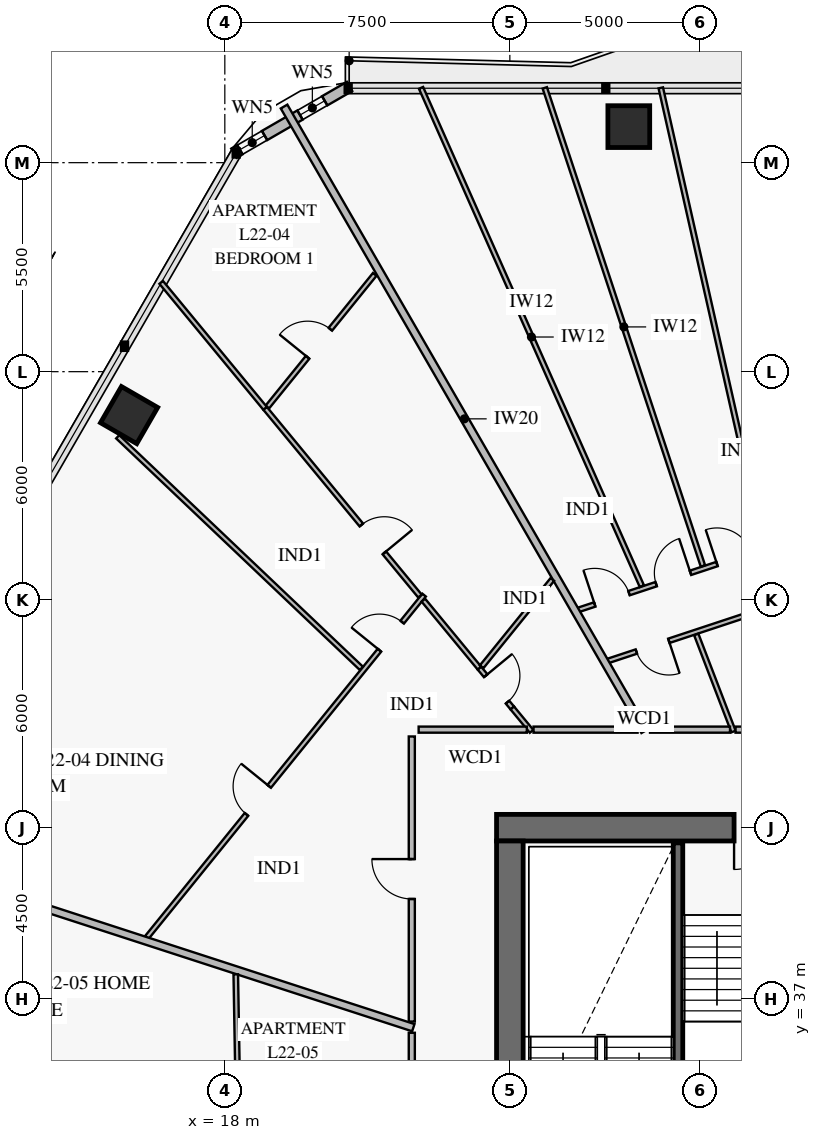
"""IFC4 building model, lengths in metres.
Left out: names, types, materials, properties, quantities, classifications, styles, units other than length and angle.
Written with IfcOpenShell. Run it as: python <this file> out.ifc"""

import sys

from ifc_helpers import new_model, si_unit, direction, frame, frame_2d, origin, origin_2d, place, context, subcontext, project, spatial, rectangle, extrude, element, fill, save


model = new_model("IFC4")
c1 = context("Model", 3, precision=1e-05, world=origin(), true_north=direction((0.0, 1.0)))
c2 = subcontext(c1, "Body", "Model", "MODEL_VIEW")
j1 = project(units=[si_unit("LENGTHUNIT", "METRE"), si_unit("PLANEANGLEUNIT", "RADIAN")], contexts=[c1])
p1 = place(None, origin())
s1 = spatial("IfcSite", under=j1, at=p1, CompositionType="ELEMENT")
p2 = place(p1, origin())
s2 = spatial("IfcBuilding", under=s1, at=p2, CompositionType="ELEMENT")
p3 = place(p2, frame((0.0, 0.0, 92.4)))
s3 = spatial("IfcBuildingStorey", under=s2, at=p3, CompositionType="ELEMENT", Elevation=92.4)
p4 = place(p3, frame((36.75, 41.5, 0.0), z_axis=(0.0, 0.0, 1.0), x_axis=(-1.0, 0.0, 0.0)))
e1 = element("IfcWall", 1, at=p4, inside=s3, PredefinedType="SHEAR", context=c2, shape_type="SweptSolid", body=[
    extrude(rectangle(XDim=11.6, YDim=0.7, at=frame_2d((5.8, 0.0))), origin(), (0.0, 0.0, 1.0), 3.8),
])
p5 = place(p4, frame((4.25, 0.0, 0.0)))
e2 = element("IfcOpeningElement", 2, at=p5, cuts=e1, PredefinedType="OPENING", context=c2, shape_type="SweptSolid", body=[
    extrude(rectangle(XDim=1.1, YDim=2.15, at=frame_2d((0.55, 1.075))), frame((0.0, 0.362, 0.0), z_axis=(0.0, -1.0, 0.0), x_axis=(1.0, 0.0, 0.0)), (0.0, 0.0, 1.0), 0.724),
])
p6 = place(p3, frame((25.5, 22.85, 0.0), z_axis=(0.0, 0.0, 1.0), x_axis=(0.0, 1.0, 0.0)))
e3 = element("IfcWall", 3, at=p6, inside=s3, PredefinedType="SHEAR", context=c2, shape_type="SweptSolid", body=[
    extrude(rectangle(XDim=18.3, YDim=0.7, at=frame_2d((9.15, 0.0))), origin(), (0.0, 0.0, 1.0), 3.8),
])
p7 = place(p6, frame((8.9, 0.0, 0.0)))
e4 = element("IfcOpeningElement", 4, at=p7, cuts=e3, PredefinedType="OPENING", context=c2, shape_type="SweptSolid", body=[
    extrude(rectangle(XDim=1.1, YDim=2.15, at=frame_2d((0.55, 1.075))), frame((0.0, 0.362, 0.0), z_axis=(0.0, -1.0, 0.0), x_axis=(1.0, 0.0, 0.0)), (0.0, 0.0, 1.0), 0.724),
])
for number, where, z_axis, x_axis in (
    (5, (28.63, 59.948, 0.0), (0.0, 0.0, 1.0), (-1.0, 0.0, 0.0)),
    (6, (15.481, 52.357, 0.0), (0.0, 0.0, 1.0), (-0.5, -0.866, 0.0)),
):
    element("IfcColumn", number, at=place(p3, frame(where, z_axis=z_axis, x_axis=x_axis)), inside=s3, PredefinedType="COLUMN", context=c2, shape_type="SweptSolid", body=[
        extrude(rectangle(XDim=1.1, YDim=1.1, at=origin_2d()), origin(), (0.0, 0.0, 1.0), 3.55),
    ])
p8 = place(p3, frame((18.239, 59.249, 0.0), z_axis=(0.0, 0.0, 1.0), x_axis=(0.866007452331, 0.500031091541, 0.0)))
e7 = element("IfcWall", 7, at=p8, inside=s3, PredefinedType="SOLIDWALL", context=c2, shape_type="SweptSolid", body=[
    extrude(rectangle(XDim=3.515, YDim=0.28, at=frame_2d((1.757, 0.0))), origin(), (0.0, 0.0, 1.0), 3.55),
])
p9 = place(p8, frame((2.009, 0.0, 0.85)))
e8 = element("IfcOpeningElement", 8, at=p9, cuts=e7, PredefinedType="OPENING", context=c2, shape_type="SweptSolid", body=[
    extrude(rectangle(XDim=0.75, YDim=1.5, at=frame_2d((0.375, 0.75))), frame((0.0, 0.152, 0.0), z_axis=(0.0, -1.0, 0.0), x_axis=(1.0, 0.0, 0.0)), (0.0, 0.0, 1.0), 0.304),
])
p10 = place(p8, frame((0.182, 0.0, 0.85)))
e9 = element("IfcOpeningElement", 9, at=p10, cuts=e7, PredefinedType="OPENING", context=c2, shape_type="SweptSolid", body=[
    extrude(rectangle(XDim=0.75, YDim=1.5, at=frame_2d((0.375, 0.75))), frame((0.0, 0.152, 0.0), z_axis=(0.0, -1.0, 0.0), x_axis=(1.0, 0.0, 0.0)), (0.0, 0.0, 1.0), 0.304),
])
p11 = place(p3, frame((29.925, 31.4, 0.0), z_axis=(0.0, 0.0, 1.0), x_axis=(0.0, 1.0, 0.0)))
e10 = element("IfcWall", 10, at=p11, inside=s3, PredefinedType="SOLIDWALL", context=c2, shape_type="SweptSolid", body=[
    extrude(rectangle(XDim=9.7, YDim=0.25, at=frame_2d((4.85, 0.0))), origin(), (0.0, 0.0, 1.0), 3.8),
])
p12 = place(p3, frame((34.122, 47.885, 0.0), z_axis=(0.0, 0.0, 1.0), x_axis=(-0.949423400421, -0.313998736834, 0.0)))
e11 = element("IfcWall", 11, at=p12, inside=s3, PredefinedType="PARTITIONING", context=c2, shape_type="SweptSolid", body=[
    extrude(rectangle(XDim=6.41, YDim=0.12, at=frame_2d((3.205, 0.0))), origin(), (0.0, 0.0, 1.0), 2.85),
])
p13 = place(p12, frame((1.546, 0.0, 0.0)))
e12 = element("IfcOpeningElement", 12, at=p13, cuts=e11, PredefinedType="OPENING", context=c2, shape_type="SweptSolid", body=[
    extrude(rectangle(XDim=0.95, YDim=2.1, at=frame_2d((0.475, 1.05))), frame((0.0, 0.072, 0.0), z_axis=(0.0, -1.0, 0.0), x_axis=(1.0, 0.0, 0.0)), (0.0, 0.0, 1.0), 0.144),
])
p14 = place(p12, frame((4.674, 0.0, 0.0)))
e13 = element("IfcOpeningElement", 13, at=p14, cuts=e11, PredefinedType="OPENING", context=c2, shape_type="SweptSolid", body=[
    extrude(rectangle(XDim=0.9, YDim=2.1, at=frame_2d((0.45, 1.05))), frame((0.0, 0.072, 0.0), z_axis=(0.0, -1.0, 0.0), x_axis=(1.0, 0.0, 0.0)), (0.0, 0.0, 1.0), 0.144),
])
p15 = place(p3, frame((33.931, 49.423, 0.0), z_axis=(0.0, 0.0, 1.0), x_axis=(-0.949429209045, -0.313981173023, 0.0)))
e14 = element("IfcWall", 14, at=p15, inside=s3, PredefinedType="PARTITIONING", context=c2, shape_type="SweptSolid", body=[
    extrude(rectangle(XDim=7.012, YDim=0.12, at=frame_2d((3.506, 0.0))), origin(), (0.0, 0.0, 1.0), 2.85),
])
p16 = place(p15, frame((0.485, 0.0, 0.0)))
e15 = element("IfcOpeningElement", 15, at=p16, cuts=e14, PredefinedType="OPENING", context=c2, shape_type="SweptSolid", body=[
    extrude(rectangle(XDim=0.95, YDim=2.1, at=frame_2d((0.475, 1.05))), frame((0.0, 0.072, 0.0), z_axis=(0.0, -1.0, 0.0), x_axis=(1.0, 0.0, 0.0)), (0.0, 0.0, 1.0), 0.144),
])
p17 = place(p15, frame((2.188, 0.0, 0.0)))
e16 = element("IfcOpeningElement", 16, at=p17, cuts=e14, PredefinedType="OPENING", context=c2, shape_type="SweptSolid", body=[
    extrude(rectangle(XDim=0.95, YDim=2.1, at=frame_2d((0.475, 1.05))), frame((0.0, 0.072, 0.0), z_axis=(0.0, -1.0, 0.0), x_axis=(1.0, 0.0, 0.0)), (0.0, 0.0, 1.0), 0.144),
])
p18 = place(p15, frame((3.874, 0.0, 0.0)))
e17 = element("IfcOpeningElement", 17, at=p18, cuts=e14, PredefinedType="OPENING", context=c2, shape_type="SweptSolid", body=[
    extrude(rectangle(XDim=0.95, YDim=2.1, at=frame_2d((0.475, 1.05))), frame((0.0, 0.072, 0.0), z_axis=(0.0, -1.0, 0.0), x_axis=(1.0, 0.0, 0.0)), (0.0, 0.0, 1.0), 0.144),
])
p19 = place(p15, frame((5.577, 0.0, 0.0)))
e18 = element("IfcOpeningElement", 18, at=p19, cuts=e14, PredefinedType="OPENING", context=c2, shape_type="SweptSolid", body=[
    extrude(rectangle(XDim=0.95, YDim=2.1, at=frame_2d((0.475, 1.05))), frame((0.0, 0.072, 0.0), z_axis=(0.0, -1.0, 0.0), x_axis=(1.0, 0.0, 0.0)), (0.0, 0.0, 1.0), 0.144),
])
p20 = place(p3, frame((23.244, 47.621, 0.0), z_axis=(0.0, 0.0, 1.0), x_axis=(-0.629321725732, -0.777144880651, 0.0)))
e19 = element("IfcWall", 19, at=p20, inside=s3, PredefinedType="PARTITIONING", context=c2, shape_type="SweptSolid", body=[
    extrude(rectangle(XDim=11.601, YDim=0.12, at=frame_2d((5.8, 0.0))), origin(), (0.0, 0.0, 1.0), 2.85),
])
p21 = place(p20, frame((0.916, 0.0, 0.0)))
e20 = element("IfcOpeningElement", 20, at=p21, cuts=e19, PredefinedType="OPENING", context=c2, shape_type="SweptSolid", body=[
    extrude(rectangle(XDim=0.95, YDim=2.1, at=frame_2d((0.475, 1.05))), frame((0.0, 0.072, 0.0), z_axis=(0.0, -1.0, 0.0), x_axis=(1.0, 0.0, 0.0)), (0.0, 0.0, 1.0), 0.144),
])
p22 = place(p20, frame((6.476, 0.0, 0.0)))
e21 = element("IfcOpeningElement", 21, at=p22, cuts=e19, PredefinedType="OPENING", context=c2, shape_type="SweptSolid", body=[
    extrude(rectangle(XDim=0.95, YDim=2.1, at=frame_2d((0.475, 1.05))), frame((0.0, 0.072, 0.0), z_axis=(0.0, -1.0, 0.0), x_axis=(1.0, 0.0, 0.0)), (0.0, 0.0, 1.0), 0.144),
])
p23 = place(p3, frame((25.565, 44.65, 0.0), z_axis=(0.0, 0.0, 1.0), x_axis=(-0.636278938951, 0.771459079827, 0.0)))
e22 = element("IfcWall", 22, at=p23, inside=s3, PredefinedType="PARTITIONING", context=c2, shape_type="SweptSolid", body=[
    extrude(rectangle(XDim=1.362, YDim=0.12, at=frame_2d((0.681, 0.0))), origin(), (0.0, 0.0, 1.0), 3.55),
])
p24 = place(p23, frame((0.2, 0.0, 0.0)))
e23 = element("IfcOpeningElement", 23, at=p24, cuts=e22, PredefinedType="OPENING", context=c2, shape_type="SweptSolid", body=[
    extrude(rectangle(XDim=0.9, YDim=2.1, at=frame_2d((0.45, 1.05))), frame((0.0, 0.072, 0.0), z_axis=(0.0, -1.0, 0.0), x_axis=(1.0, 0.0, 0.0)), (0.0, 0.0, 1.0), 0.144),
])
p25 = place(p3, frame((24.698, 45.7, 0.0), z_axis=(0.0, 0.0, 1.0), x_axis=(-0.636404893794, 0.771355178342, 0.0)))
e24 = element("IfcWall", 24, at=p25, inside=s3, PredefinedType="PARTITIONING", context=c2, shape_type="SweptSolid", body=[
    extrude(rectangle(XDim=2.317, YDim=0.12, at=frame_2d((1.159, 0.0))), origin(), (0.0, 0.0, 1.0), 3.55),
])
p26 = place(p3, frame((23.135, 47.595, 0.0), z_axis=(0.0, 0.0, 1.0), x_axis=(-0.636375017003, 0.77137982715, 0.0)))
e25 = element("IfcWall", 25, at=p26, inside=s3, PredefinedType="PARTITIONING", context=c2, shape_type="SweptSolid", body=[
    extrude(rectangle(XDim=6.405, YDim=0.12, at=frame_2d((3.203, 0.0))), origin(), (0.0, 0.0, 1.0), 3.1),
])
p27 = place(p26, frame((1.474, 0.0, 0.0)))
e26 = element("IfcOpeningElement", 26, at=p27, cuts=e25, PredefinedType="OPENING", context=c2, shape_type="SweptSolid", body=[
    extrude(rectangle(XDim=0.95, YDim=2.1, at=frame_2d((0.475, 1.05))), frame((0.0, 0.072, 0.0), z_axis=(0.0, -1.0, 0.0), x_axis=(1.0, 0.0, 0.0)), (0.0, 0.0, 1.0), 0.144),
])
p28 = place(p3, frame((21.944, 56.059, 0.0), z_axis=(0.0, 0.0, 1.0), x_axis=(-0.629293659157, -0.777167607756, 0.0)))
e27 = element("IfcWall", 27, at=p28, inside=s3, PredefinedType="PARTITIONING", context=c2, shape_type="SweptSolid", body=[
    extrude(rectangle(XDim=4.489, YDim=0.12, at=frame_2d((2.245, 0.0))), origin(), (0.0, 0.0, 1.0), 2.8),
])
p29 = place(p28, frame((1.855, 0.0, 0.0)))
e28 = element("IfcOpeningElement", 28, at=p29, cuts=e27, PredefinedType="OPENING", context=c2, shape_type="SweptSolid", body=[
    extrude(rectangle(XDim=0.95, YDim=2.1, at=frame_2d((0.475, 1.05))), frame((0.0, 0.072, 0.0), z_axis=(0.0, -1.0, 0.0), x_axis=(1.0, 0.0, 0.0)), (0.0, 0.0, 1.0), 0.144),
])
p30 = place(p3, frame((22.92, 43.9, 0.0), z_axis=(0.0, 0.0, 1.0), x_axis=(0.0, -1.0, 0.0)))
e29 = element("IfcWall", 29, at=p30, inside=s3, PredefinedType="PARTITIONING", context=c2, shape_type="SweptSolid", body=[
    extrude(rectangle(XDim=7.502, YDim=0.16, at=frame_2d((3.751, 0.0))), origin(), (0.0, 0.0, 1.0), 3.55),
])
p31 = place(p30, frame((3.226, 0.0, 0.0)))
e30 = element("IfcOpeningElement", 30, at=p31, cuts=e29, PredefinedType="OPENING", context=c2, shape_type="SweptSolid", body=[
    extrude(rectangle(XDim=1.05, YDim=2.15, at=frame_2d((0.525, 1.075))), frame((0.0, 0.092, 0.0), z_axis=(0.0, -1.0, 0.0), x_axis=(1.0, 0.0, 0.0)), (0.0, 0.0, 1.0), 0.184),
])
p32 = place(p3, frame((31.385, 44.03, 0.0), z_axis=(0.0, 0.0, 1.0), x_axis=(-0.35815382697, 0.933662592282, 0.0)))
e31 = element("IfcWall", 31, at=p32, inside=s3, PredefinedType="PARTITIONING", context=c2, shape_type="SweptSolid", body=[
    extrude(rectangle(XDim=2.736, YDim=0.12, at=frame_2d((1.368, 0.0))), origin(), (0.0, 0.0, 1.0), 3.55),
])
p33 = place(p3, frame((32.188, 48.918, 0.0), z_axis=(0.0, 0.0, 1.0), x_axis=(-0.2198592635, 0.975531600848, 0.0)))
e32 = element("IfcWall", 32, at=p33, inside=s3, PredefinedType="PARTITIONING", context=c2, shape_type="SweptSolid", body=[
    extrude(rectangle(XDim=12.353, YDim=0.12, at=frame_2d((6.176, 0.0))), origin(), (0.0, 0.0, 1.0), 2.8),
])
p34 = place(p3, frame((30.581, 48.387, 0.0), z_axis=(0.0, 0.0, 1.0), x_axis=(-0.31398296165, 0.949428617534, 0.0)))
e33 = element("IfcWall", 33, at=p34, inside=s3, PredefinedType="PARTITIONING", context=c2, shape_type="SweptSolid", body=[
    extrude(rectangle(XDim=13.252, YDim=0.12, at=frame_2d((6.626, 0.0))), origin(), (0.0, 0.0, 1.0), 2.8),
])
p35 = place(p3, frame((28.974, 47.855, 0.0), z_axis=(0.0, 0.0, 1.0), x_axis=(-0.405149568186, 0.91425041832, 0.0)))
e34 = element("IfcWall", 34, at=p35, inside=s3, PredefinedType="PARTITIONING", context=c2, shape_type="SweptSolid", body=[
    extrude(rectangle(XDim=14.343, YDim=0.12, at=frame_2d((7.171, 0.0))), origin(), (0.0, 0.0, 1.0), 2.8),
])
p36 = place(p3, frame((29.049, 44.04, 0.0), z_axis=(0.0, 0.0, 1.0), x_axis=(-0.499993398997, 0.866029214842, 0.0)))
e35 = element("IfcWall", 35, at=p36, inside=s3, PredefinedType="PARTITIONING", context=c2, shape_type="SweptSolid", body=[
    extrude(rectangle(XDim=18.98, YDim=0.2, at=frame_2d((9.49, 0.0))), origin(), (0.0, 0.0, 1.0), 2.8),
])
p37 = place(p3, frame((21.594, 45.692, 0.0), z_axis=(0.0, 0.0, 1.0), x_axis=(-0.724829920805, 0.688927852467, 0.0)))
e36 = element("IfcWall", 36, at=p37, inside=s3, PredefinedType="PARTITIONING", context=c2, shape_type="SweptSolid", body=[
    extrude(rectangle(XDim=8.847, YDim=0.12, at=frame_2d((4.423, 0.0))), origin(), (0.0, 0.0, 1.0), 2.8),
])
p38 = place(p3, frame((26.072, 44.035, 0.0), z_axis=(0.0, 0.0, 1.0), x_axis=(-0.636351066899, 0.771399584947, 0.0)))
e37 = element("IfcWall", 37, at=p38, inside=s3, PredefinedType="PARTITIONING", context=c2, shape_type="SweptSolid", body=[
    extrude(rectangle(XDim=0.797, YDim=0.12, at=frame_2d((0.398, 0.0))), origin(), (0.0, 0.0, 1.0), 3.55),
])
p39 = place(p3, frame((19.059, 52.536, 0.0), z_axis=(0.0, 0.0, 1.0), x_axis=(-0.636324617316, 0.771421403254, 0.0)))
e38 = element("IfcWall", 38, at=p39, inside=s3, PredefinedType="PARTITIONING", context=c2, shape_type="SweptSolid", body=[
    extrude(rectangle(XDim=4.296, YDim=0.12, at=frame_2d((2.148, 0.0))), origin(), (0.0, 0.0, 1.0), 2.8),
])
p40 = place(p3, frame((26.619, 48.033, 0.0), z_axis=(0.0, 0.0, 1.0), x_axis=(-0.629295602894, -0.777166033855, 0.0)))
e39 = element("IfcWall", 39, at=p40, inside=s3, PredefinedType="PARTITIONING", context=c2, shape_type="SweptSolid", body=[
    extrude(rectangle(XDim=2.957, YDim=0.12, at=frame_2d((1.479, 0.0))), origin(), (0.0, 0.0, 1.0), 3.55),
])
p41 = place(p3, frame((22.96, 36.237, 0.0), z_axis=(0.0, 0.0, 1.0), x_axis=(-0.95105675479, 0.309016260362, 0.0)))
e40 = element("IfcWall", 40, at=p41, inside=s3, PredefinedType="PARTITIONING", context=c2, shape_type="SweptSolid", body=[
    extrude(rectangle(XDim=15.894, YDim=0.2, at=frame_2d((7.947, 0.0))), origin(), (0.0, 0.0, 1.0), 2.8),
])
p42 = place(p3, frame((18.288, 37.641, 0.0), z_axis=(0.0, 0.0, 1.0), x_axis=(0.017415945178, -0.999848330925, 0.0)))
e41 = element("IfcWall", 41, at=p42, inside=s3, PredefinedType="PARTITIONING", context=c2, shape_type="SweptSolid", body=[
    extrude(rectangle(XDim=4.514, YDim=0.12, at=frame_2d((2.257, 0.0))), origin(), (0.0, 0.0, 1.0), 2.85),
])
p43 = place(p3, frame((34.427, 44.08, 0.0), z_axis=(0.0, 0.0, 1.0), x_axis=(-1.0, 0.0, 0.0)))
e42 = element("IfcWall", 42, at=p43, inside=s3, PredefinedType="PARTITIONING", context=c2, shape_type="SweptSolid", body=[
    extrude(rectangle(XDim=2.988, YDim=0.16, at=frame_2d((1.494, 0.0))), origin(), (0.0, 0.0, 1.0), 2.85),
])
p44 = place(p3, frame((31.293, 44.08, 0.0), z_axis=(0.0, 0.0, 1.0), x_axis=(-1.0, 0.0, 0.0)))
e43 = element("IfcWall", 43, at=p44, inside=s3, PredefinedType="PARTITIONING", context=c2, shape_type="SweptSolid", body=[
    extrude(rectangle(XDim=2.104, YDim=0.16, at=frame_2d((1.052, 0.0))), origin(), (0.0, 0.0, 1.0), 3.55),
])
p45 = place(p3, frame((25.947, 44.08, 0.0), z_axis=(0.0, 0.0, 1.0), x_axis=(-1.0, 0.0, 0.0)))
e44 = element("IfcWall", 44, at=p45, inside=s3, PredefinedType="PARTITIONING", context=c2, shape_type="SweptSolid", body=[
    extrude(rectangle(XDim=2.847, YDim=0.16, at=frame_2d((1.423, 0.0))), origin(), (0.0, 0.0, 1.0), 2.85),
])
p46 = place(p3, frame((28.861, 44.08, 0.0), z_axis=(0.0, 0.0, 1.0), x_axis=(-1.0, 0.0, 0.0)))
e45 = element("IfcWall", 45, at=p46, inside=s3, PredefinedType="PARTITIONING", context=c2, shape_type="SweptSolid", body=[
    extrude(rectangle(XDim=2.738, YDim=0.16, at=frame_2d((1.369, 0.0))), origin(), (0.0, 0.0, 1.0), 3.55),
])
p47 = place(p3, frame((22.92, 36.103, 0.0), z_axis=(0.0, 0.0, 1.0), x_axis=(0.0, -1.0, 0.0)))
e46 = element("IfcWall", 46, at=p47, inside=s3, PredefinedType="PARTITIONING", context=c2, shape_type="SweptSolid", body=[
    extrude(rectangle(XDim=3.249, YDim=0.16, at=frame_2d((1.624, 0.0))), origin(), (0.0, 0.0, 1.0), 2.85),
])
p48 = place(p9, origin())
e47 = element("IfcWindow", 47, at=p48, inside=s3, PartitioningType="SINGLE_PANEL", PredefinedType="WINDOW", context=c2, shape_type="SweptSolid", body=[
    extrude(rectangle(XDim=0.75, YDim=1.5, at=frame_2d((0.375, 0.75))), frame((0.0, 0.03, 0.0), z_axis=(0.0, -1.0, 0.0), x_axis=(1.0, 0.0, 0.0)), (0.0, 0.0, 1.0), 0.06),
])
fill(e8, e47)
p49 = place(p10, origin())
e48 = element("IfcWindow", 48, at=p49, inside=s3, PartitioningType="SINGLE_PANEL", PredefinedType="WINDOW", context=c2, shape_type="SweptSolid", body=[
    extrude(rectangle(XDim=0.75, YDim=1.5, at=frame_2d((0.375, 0.75))), frame((0.0, 0.03, 0.0), z_axis=(0.0, -1.0, 0.0), x_axis=(1.0, 0.0, 0.0)), (0.0, 0.0, 1.0), 0.06),
])
fill(e9, e48)
p50 = place(p5, origin())
e49 = element("IfcDoor", 49, at=p50, inside=s3, OperationType="SINGLE_SWING_RIGHT", PredefinedType="USERDEFINED", context=c2, shape_type="SweptSolid", body=[
    extrude(rectangle(XDim=1.1, YDim=2.15, at=frame_2d((0.55, 1.075))), frame((0.0, 0.025, 0.0), z_axis=(0.0, -1.0, 0.0), x_axis=(1.0, 0.0, 0.0)), (0.0, 0.0, 1.0), 0.05),
])
fill(e2, e49)
p51 = place(p14, origin())
e50 = element("IfcDoor", 50, at=p51, inside=s3, OperationType="SINGLE_SWING_LEFT", PredefinedType="DOOR", context=c2, shape_type="SweptSolid", body=[
    extrude(rectangle(XDim=0.9, YDim=2.1, at=frame_2d((0.45, 1.05))), frame((0.0, 0.025, 0.0), z_axis=(0.0, -1.0, 0.0), x_axis=(1.0, 0.0, 0.0)), (0.0, 0.0, 1.0), 0.05),
])
fill(e13, e50)
p52 = place(p17, frame((0.95, 0.0, 0.0), z_axis=(0.0, 0.0, 1.0), x_axis=(-1.0, 0.0, 0.0)))
e51 = element("IfcDoor", 51, at=p52, inside=s3, OperationType="SINGLE_SWING_LEFT", PredefinedType="DOOR", context=c2, shape_type="SweptSolid", body=[
    extrude(rectangle(XDim=0.95, YDim=2.1, at=frame_2d((0.475, 1.05))), frame((0.0, 0.025, 0.0), z_axis=(0.0, -1.0, 0.0), x_axis=(1.0, 0.0, 0.0)), (0.0, 0.0, 1.0), 0.05),
])
fill(e16, e51)
p53 = place(p18, frame((0.95, 0.0, 0.0), z_axis=(0.0, 0.0, 1.0), x_axis=(-1.0, 0.0, 0.0)))
e52 = element("IfcDoor", 52, at=p53, inside=s3, OperationType="SINGLE_SWING_RIGHT", PredefinedType="DOOR", context=c2, shape_type="SweptSolid", body=[
    extrude(rectangle(XDim=0.95, YDim=2.1, at=frame_2d((0.475, 1.05))), frame((0.0, 0.025, 0.0), z_axis=(0.0, -1.0, 0.0), x_axis=(1.0, 0.0, 0.0)), (0.0, 0.0, 1.0), 0.05),
])
fill(e17, e52)
p54 = place(p19, frame((0.95, 0.0, 0.0), z_axis=(0.0, 0.0, 1.0), x_axis=(-1.0, 0.0, 0.0)))
e53 = element("IfcDoor", 53, at=p54, inside=s3, OperationType="SINGLE_SWING_LEFT", PredefinedType="DOOR", context=c2, shape_type="SweptSolid", body=[
    extrude(rectangle(XDim=0.95, YDim=2.1, at=frame_2d((0.475, 1.05))), frame((0.0, 0.025, 0.0), z_axis=(0.0, -1.0, 0.0), x_axis=(1.0, 0.0, 0.0)), (0.0, 0.0, 1.0), 0.05),
])
fill(e18, e53)
p55 = place(p21, frame((0.95, 0.0, 0.0), z_axis=(0.0, 0.0, 1.0), x_axis=(-1.0, 0.0, 0.0)))
e54 = element("IfcDoor", 54, at=p55, inside=s3, OperationType="SINGLE_SWING_LEFT", PredefinedType="DOOR", context=c2, shape_type="SweptSolid", body=[
    extrude(rectangle(XDim=0.95, YDim=2.1, at=frame_2d((0.475, 1.05))), frame((0.0, 0.025, 0.0), z_axis=(0.0, -1.0, 0.0), x_axis=(1.0, 0.0, 0.0)), (0.0, 0.0, 1.0), 0.05),
])
fill(e20, e54)
p56 = place(p22, frame((0.95, 0.0, 0.0), z_axis=(0.0, 0.0, 1.0), x_axis=(-1.0, 0.0, 0.0)))
e55 = element("IfcDoor", 55, at=p56, inside=s3, OperationType="SINGLE_SWING_RIGHT", PredefinedType="DOOR", context=c2, shape_type="SweptSolid", body=[
    extrude(rectangle(XDim=0.95, YDim=2.1, at=frame_2d((0.475, 1.05))), frame((0.0, 0.025, 0.0), z_axis=(0.0, -1.0, 0.0), x_axis=(1.0, 0.0, 0.0)), (0.0, 0.0, 1.0), 0.05),
])
fill(e21, e55)
p57 = place(p24, frame((0.9, 0.0, 0.0), z_axis=(0.0, 0.0, 1.0), x_axis=(-1.0, 0.0, 0.0)))
e56 = element("IfcDoor", 56, at=p57, inside=s3, OperationType="SINGLE_SWING_LEFT", PredefinedType="DOOR", context=c2, shape_type="SweptSolid", body=[
    extrude(rectangle(XDim=0.9, YDim=2.1, at=frame_2d((0.45, 1.05))), frame((0.0, 0.025, 0.0), z_axis=(0.0, -1.0, 0.0), x_axis=(1.0, 0.0, 0.0)), (0.0, 0.0, 1.0), 0.05),
])
fill(e23, e56)
p58 = place(p27, frame((0.95, 0.0, 0.0), z_axis=(0.0, 0.0, 1.0), x_axis=(-1.0, 0.0, 0.0)))
e57 = element("IfcDoor", 57, at=p58, inside=s3, OperationType="SINGLE_SWING_RIGHT", PredefinedType="DOOR", context=c2, shape_type="SweptSolid", body=[
    extrude(rectangle(XDim=0.95, YDim=2.1, at=frame_2d((0.475, 1.05))), frame((0.0, 0.025, 0.0), z_axis=(0.0, -1.0, 0.0), x_axis=(1.0, 0.0, 0.0)), (0.0, 0.0, 1.0), 0.05),
])
fill(e26, e57)
p59 = place(p29, frame((0.95, 0.0, 0.0), z_axis=(0.0, 0.0, 1.0), x_axis=(-1.0, 0.0, 0.0)))
e58 = element("IfcDoor", 58, at=p59, inside=s3, OperationType="SINGLE_SWING_LEFT", PredefinedType="DOOR", context=c2, shape_type="SweptSolid", body=[
    extrude(rectangle(XDim=0.95, YDim=2.1, at=frame_2d((0.475, 1.05))), frame((0.0, 0.025, 0.0), z_axis=(0.0, -1.0, 0.0), x_axis=(1.0, 0.0, 0.0)), (0.0, 0.0, 1.0), 0.05),
])
fill(e28, e58)
p60 = place(p31, frame((1.05, 0.0, 0.0), z_axis=(0.0, 0.0, 1.0), x_axis=(-1.0, 0.0, 0.0)))
e59 = element("IfcDoor", 59, at=p60, inside=s3, OperationType="SINGLE_SWING_RIGHT", PredefinedType="DOOR", context=c2, shape_type="SweptSolid", body=[
    extrude(rectangle(XDim=1.05, YDim=2.15, at=frame_2d((0.525, 1.075))), frame((0.0, 0.025, 0.0), z_axis=(0.0, -1.0, 0.0), x_axis=(1.0, 0.0, 0.0)), (0.0, 0.0, 1.0), 0.05),
])
fill(e30, e59)
save(model, sys.argv[1])
